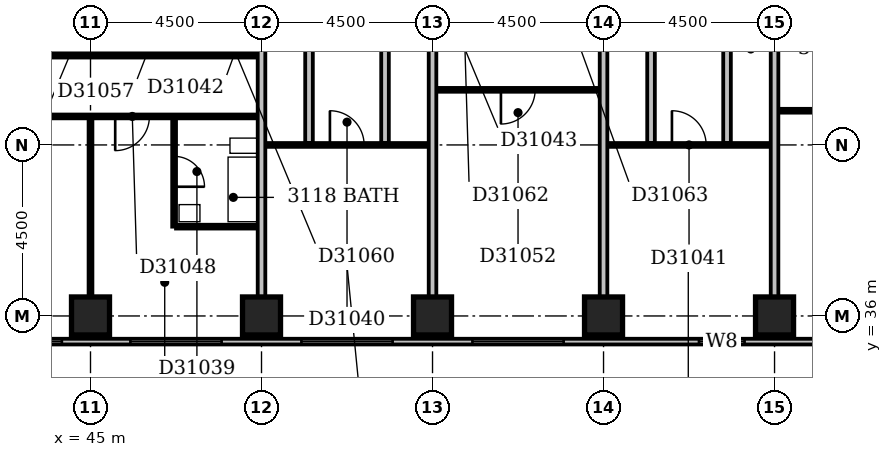
"""IFC4 building model, lengths in metres.
Left out: names, types, materials, properties, quantities, classifications, styles, units other than length and angle.
Written with IfcOpenShell. Run it as: python <this file> out.ifc"""

import sys

from ifc_helpers import new_model, si_unit, direction, frame, frame_2d, origin, origin_2d, place, context, subcontext, project, spatial, rectangle, extrude, element, fill, save


model = new_model("IFC4")
c1 = context("Model", 3, precision=1e-05, world=origin(), true_north=direction((0.0, 1.0)))
c2 = subcontext(c1, "Body", "Model", "MODEL_VIEW")
j1 = project(units=[si_unit("LENGTHUNIT", "METRE"), si_unit("PLANEANGLEUNIT", "RADIAN")], contexts=[c1])
p1 = place(None, origin())
s1 = spatial("IfcSite", under=j1, at=p1, CompositionType="ELEMENT")
p2 = place(p1, origin())
s2 = spatial("IfcBuilding", under=s1, at=p2, CompositionType="ELEMENT")
p3 = place(p2, frame((0.0, 0.0, 126.8)))
s3 = spatial("IfcBuildingStorey", under=s2, at=p3, CompositionType="ELEMENT", Elevation=126.8)
for number, where, z_axis, x_axis in (
    (1, (45.0, 36.0, -0.3), (0.0, 0.0, 1.0), (1.0, 0.0, 0.0)),
    (2, (49.5, 36.0, -0.3), (0.0, 0.0, 1.0), (1.0, 0.0, 0.0)),
    (3, (54.0, 36.0, -0.3), (0.0, 0.0, 1.0), (1.0, 0.0, 0.0)),
    (4, (58.5, 36.0, -0.3), (0.0, 0.0, 1.0), (1.0, 0.0, 0.0)),
    (5, (63.0, 36.0, -0.3), (0.0, 0.0, 1.0), (1.0, 0.0, 0.0)),
):
    element("IfcColumn", number, at=place(p3, frame(where, z_axis=z_axis, x_axis=x_axis)), inside=s3, PredefinedType="COLUMN", context=c2, shape_type="SweptSolid", body=[
        extrude(rectangle(XDim=1.0, YDim=1.0, at=origin_2d()), origin(), (0.0, 0.0, 1.0), 3.6),
    ])
p4 = place(p3, frame((23.1, 35.325, 0.0), z_axis=(0.0, 0.0, 1.0), x_axis=(1.0, 0.0, 0.0)))
e6 = element("IfcWall", 6, at=p4, inside=s3, PredefinedType="STANDARD", context=c2, shape_type="SweptSolid", body=[
    extrude(rectangle(XDim=45.15, YDim=0.15, at=frame_2d((22.575, 0.0))), origin(), (0.0, 0.0, 1.0), 2.7),
])
p5 = place(p4, frame((0.45, 0.0, 0.6)))
e7 = element("IfcOpeningElement", 7, at=p5, cuts=e6, PredefinedType="OPENING", context=c2, shape_type="SweptSolid", body=[
    extrude(rectangle(XDim=2.4, YDim=1.8, at=frame_2d((1.2, 0.9))), frame((0.0, 0.087, 0.0), z_axis=(0.0, -1.0, 0.0), x_axis=(1.0, 0.0, 0.0)), (0.0, 0.0, 1.0), 0.174),
])
p6 = place(p4, frame((4.743, 0.0, 0.6)))
e8 = element("IfcOpeningElement", 8, at=p6, cuts=e6, PredefinedType="OPENING", context=c2, shape_type="SweptSolid", body=[
    extrude(rectangle(XDim=1.8, YDim=1.8, at=frame_2d((0.9, 0.9))), frame((0.0, 0.087, 0.0), z_axis=(0.0, -1.0, 0.0), x_axis=(1.0, 0.0, 0.0)), (0.0, 0.0, 1.0), 0.174),
])
p7 = place(p4, frame((9.45, 0.0, 0.6)))
e9 = element("IfcOpeningElement", 9, at=p7, cuts=e6, PredefinedType="OPENING", context=c2, shape_type="SweptSolid", body=[
    extrude(rectangle(XDim=2.4, YDim=1.8, at=frame_2d((1.2, 0.9))), frame((0.0, 0.087, 0.0), z_axis=(0.0, -1.0, 0.0), x_axis=(1.0, 0.0, 0.0)), (0.0, 0.0, 1.0), 0.174),
])
p8 = place(p4, frame((13.95, 0.0, 0.6)))
e10 = element("IfcOpeningElement", 10, at=p8, cuts=e6, PredefinedType="OPENING", context=c2, shape_type="SweptSolid", body=[
    extrude(rectangle(XDim=2.4, YDim=1.8, at=frame_2d((1.2, 0.9))), frame((0.0, 0.087, 0.0), z_axis=(0.0, -1.0, 0.0), x_axis=(1.0, 0.0, 0.0)), (0.0, 0.0, 1.0), 0.174),
])
p9 = place(p4, frame((19.646, 0.0, 0.6)))
e11 = element("IfcOpeningElement", 11, at=p9, cuts=e6, PredefinedType="OPENING", context=c2, shape_type="SweptSolid", body=[
    extrude(rectangle(XDim=1.5, YDim=1.8, at=frame_2d((0.75, 0.9))), frame((0.0, 0.087, 0.0), z_axis=(0.0, -1.0, 0.0), x_axis=(1.0, 0.0, 0.0)), (0.0, 0.0, 1.0), 0.174),
])
p10 = place(p4, frame((22.95, 0.0, 0.6)))
e12 = element("IfcOpeningElement", 12, at=p10, cuts=e6, PredefinedType="OPENING", context=c2, shape_type="SweptSolid", body=[
    extrude(rectangle(XDim=2.4, YDim=1.8, at=frame_2d((1.2, 0.9))), frame((0.0, 0.087, 0.0), z_axis=(0.0, -1.0, 0.0), x_axis=(1.0, 0.0, 0.0)), (0.0, 0.0, 1.0), 0.174),
])
p11 = place(p4, frame((27.45, 0.0, 0.6)))
e13 = element("IfcOpeningElement", 13, at=p11, cuts=e6, PredefinedType="OPENING", context=c2, shape_type="SweptSolid", body=[
    extrude(rectangle(XDim=2.4, YDim=1.8, at=frame_2d((1.2, 0.9))), frame((0.0, 0.087, 0.0), z_axis=(0.0, -1.0, 0.0), x_axis=(1.0, 0.0, 0.0)), (0.0, 0.0, 1.0), 0.174),
])
p12 = place(p4, frame((31.95, 0.0, 0.6)))
e14 = element("IfcOpeningElement", 14, at=p12, cuts=e6, PredefinedType="OPENING", context=c2, shape_type="SweptSolid", body=[
    extrude(rectangle(XDim=2.4, YDim=1.8, at=frame_2d((1.2, 0.9))), frame((0.0, 0.087, 0.0), z_axis=(0.0, -1.0, 0.0), x_axis=(1.0, 0.0, 0.0)), (0.0, 0.0, 1.0), 0.174),
])
p13 = place(p4, frame((37.911, 0.0, 0.6)))
e15 = element("IfcOpeningElement", 15, at=p13, cuts=e6, PredefinedType="OPENING", context=c2, shape_type="SweptSolid", body=[
    extrude(rectangle(XDim=1.2, YDim=1.8, at=frame_2d((0.6, 0.9))), frame((0.0, 0.087, 0.0), z_axis=(0.0, -1.0, 0.0), x_axis=(1.0, 0.0, 0.0)), (0.0, 0.0, 1.0), 0.174),
])
p14 = place(p4, frame((40.95, 0.0, 0.6)))
e16 = element("IfcOpeningElement", 16, at=p14, cuts=e6, PredefinedType="OPENING", context=c2, shape_type="SweptSolid", body=[
    extrude(rectangle(XDim=2.4, YDim=1.8, at=frame_2d((1.2, 0.9))), frame((0.0, 0.087, 0.0), z_axis=(0.0, -1.0, 0.0), x_axis=(1.0, 0.0, 0.0)), (0.0, 0.0, 1.0), 0.174),
])
p15 = place(p3, frame((45.0, 36.5, 0.0), z_axis=(0.0, 0.0, 1.0), x_axis=(0.0, 1.0, 0.0)))
e17 = element("IfcWall", 17, at=p15, inside=s3, PredefinedType="PARTITIONING", context=c2, shape_type="SweptSolid", body=[
    extrude(rectangle(XDim=4.7, YDim=0.1, at=frame_2d((2.35, 0.0))), origin(), (0.0, 0.0, 1.0), 2.6),
])
p16 = place(p3, frame((49.5, 36.5, 0.0), z_axis=(0.0, 0.0, 1.0), x_axis=(0.0, 1.0, 0.0)))
e18 = element("IfcWall", 18, at=p16, inside=s3, PredefinedType="PARTITIONING", context=c2, shape_type="SweptSolid", body=[
    extrude(rectangle(XDim=12.9, YDim=0.2, at=frame_2d((6.45, 0.0))), origin(), (0.0, 0.0, 1.0), 3.3),
])
p17 = place(p3, frame((54.0, 36.5, 0.0), z_axis=(0.0, 0.0, 1.0), x_axis=(0.0, 1.0, 0.0)))
e19 = element("IfcWall", 19, at=p17, inside=s3, PredefinedType="PARTITIONING", context=c2, shape_type="SweptSolid", body=[
    extrude(rectangle(XDim=12.9, YDim=0.2, at=frame_2d((6.45, 0.0))), origin(), (0.0, 0.0, 1.0), 2.6),
])
p18 = place(p3, frame((58.5, 36.5, 0.0), z_axis=(0.0, 0.0, 1.0), x_axis=(0.0, 1.0, 0.0)))
e20 = element("IfcWall", 20, at=p18, inside=s3, PredefinedType="PARTITIONING", context=c2, shape_type="SweptSolid", body=[
    extrude(rectangle(XDim=12.9, YDim=0.2, at=frame_2d((6.45, 0.0))), origin(), (0.0, 0.0, 1.0), 3.3),
])
p19 = place(p3, frame((63.0, 36.5, 0.0), z_axis=(0.0, 0.0, 1.0), x_axis=(0.0, 1.0, 0.0)))
e21 = element("IfcWall", 21, at=p19, inside=s3, PredefinedType="PARTITIONING", context=c2, shape_type="SweptSolid", body=[
    extrude(rectangle(XDim=12.9, YDim=0.2, at=frame_2d((6.45, 0.0))), origin(), (0.0, 0.0, 1.0), 2.4),
])
p20 = place(p3, frame((47.2, 38.35, 0.0), z_axis=(0.0, 0.0, 1.0), x_axis=(0.0, 1.0, 0.0)))
e22 = element("IfcWall", 22, at=p20, inside=s3, PredefinedType="PLUMBINGWALL", context=c2, shape_type="SweptSolid", body=[
    extrude(rectangle(XDim=2.85, YDim=0.1, at=frame_2d((1.425, 0.0))), origin(), (0.0, 0.0, 1.0), 3.3),
])
p21 = place(p20, frame((1.05, 0.0, 0.0)))
e23 = element("IfcOpeningElement", 23, at=p21, cuts=e22, PredefinedType="OPENING", context=c2, shape_type="SweptSolid", body=[
    extrude(rectangle(XDim=0.8, YDim=2.1, at=frame_2d((0.4, 1.05))), frame((0.0, 0.062, 0.0), z_axis=(0.0, -1.0, 0.0), x_axis=(1.0, 0.0, 0.0)), (0.0, 0.0, 1.0), 0.124),
])
p22 = place(p3, frame((47.25, 38.35, 0.0), z_axis=(0.0, 0.0, 1.0), x_axis=(1.0, 0.0, 0.0)))
e24 = element("IfcWall", 24, at=p22, inside=s3, PredefinedType="PLUMBINGWALL", context=c2, shape_type="SweptSolid", body=[
    extrude(rectangle(XDim=2.15, YDim=0.1, at=frame_2d((1.075, 0.0))), origin(), (0.0, 0.0, 1.0), 3.3),
])
p23 = place(p3, frame((49.6, 40.5, 0.0), z_axis=(0.0, 0.0, 1.0), x_axis=(1.0, 0.0, 0.0)))
e25 = element("IfcWall", 25, at=p23, inside=s3, PredefinedType="PARTITIONING", context=c2, shape_type="SweptSolid", body=[
    extrude(rectangle(XDim=4.3, YDim=0.1, at=frame_2d((2.15, 0.0))), origin(), (0.0, 0.0, 1.0), 3.3),
])
p24 = place(p23, frame((1.7, 0.0, 0.0)))
e26 = element("IfcOpeningElement", 26, at=p24, cuts=e25, PredefinedType="OPENING", context=c2, shape_type="SweptSolid", body=[
    extrude(rectangle(XDim=0.9, YDim=2.1, at=frame_2d((0.45, 1.05))), frame((0.0, 0.062, 0.0), z_axis=(0.0, -1.0, 0.0), x_axis=(1.0, 0.0, 0.0)), (0.0, 0.0, 1.0), 0.124),
])
p25 = place(p3, frame((58.6, 40.5, 0.0), z_axis=(0.0, 0.0, 1.0), x_axis=(1.0, 0.0, 0.0)))
e27 = element("IfcWall", 27, at=p25, inside=s3, PredefinedType="PARTITIONING", context=c2, shape_type="SweptSolid", body=[
    extrude(rectangle(XDim=4.3, YDim=0.1, at=frame_2d((2.15, 0.0))), origin(), (0.0, 0.0, 1.0), 3.3),
])
p26 = place(p25, frame((1.7, 0.0, 0.0)))
e28 = element("IfcOpeningElement", 28, at=p26, cuts=e27, PredefinedType="OPENING", context=c2, shape_type="SweptSolid", body=[
    extrude(rectangle(XDim=0.9, YDim=2.1, at=frame_2d((0.45, 1.05))), frame((0.0, 0.062, 0.0), z_axis=(0.0, -1.0, 0.0), x_axis=(1.0, 0.0, 0.0)), (0.0, 0.0, 1.0), 0.124),
])
p27 = place(p3, frame((50.75, 40.55, 0.0), z_axis=(0.0, 0.0, 1.0), x_axis=(0.0, 1.0, 0.0)))
e29 = element("IfcWall", 29, at=p27, inside=s3, PredefinedType="PARTITIONING", context=c2, shape_type="SweptSolid", body=[
    extrude(rectangle(XDim=8.95, YDim=0.2, at=frame_2d((4.475, 0.0))), origin(), (0.0, 0.0, 1.0), 3.3),
])
p28 = place(p27, frame((5.55, 0.0, 0.0)))
e30 = element("IfcOpeningElement", 30, at=p28, cuts=e29, PredefinedType="OPENING", context=c2, shape_type="SweptSolid", body=[
    extrude(rectangle(XDim=0.8, YDim=2.1, at=frame_2d((0.4, 1.05))), frame((0.0, 0.112, 0.0), z_axis=(0.0, -1.0, 0.0), x_axis=(1.0, 0.0, 0.0)), (0.0, 0.0, 1.0), 0.224),
])
p29 = place(p3, frame((52.75, 40.55, 0.0), z_axis=(0.0, 0.0, 1.0), x_axis=(0.0, 1.0, 0.0)))
e31 = element("IfcWall", 31, at=p29, inside=s3, PredefinedType="PARTITIONING", context=c2, shape_type="SweptSolid", body=[
    extrude(rectangle(XDim=8.95, YDim=0.2, at=frame_2d((4.475, 0.0))), origin(), (0.0, 0.0, 1.0), 3.3),
])
p30 = place(p29, frame((5.55, 0.0, 0.0)))
e32 = element("IfcOpeningElement", 32, at=p30, cuts=e31, PredefinedType="OPENING", context=c2, shape_type="SweptSolid", body=[
    extrude(rectangle(XDim=0.8, YDim=2.1, at=frame_2d((0.4, 1.05))), frame((0.0, 0.112, 0.0), z_axis=(0.0, -1.0, 0.0), x_axis=(1.0, 0.0, 0.0)), (0.0, 0.0, 1.0), 0.224),
])
p31 = place(p3, frame((59.75, 40.55, 0.0), z_axis=(0.0, 0.0, 1.0), x_axis=(0.0, 1.0, 0.0)))
e33 = element("IfcWall", 33, at=p31, inside=s3, PredefinedType="PARTITIONING", context=c2, shape_type="SweptSolid", body=[
    extrude(rectangle(XDim=8.95, YDim=0.2, at=frame_2d((4.475, 0.0))), origin(), (0.0, 0.0, 1.0), 3.3),
])
p32 = place(p31, frame((5.55, 0.0, 0.0)))
e34 = element("IfcOpeningElement", 34, at=p32, cuts=e33, PredefinedType="OPENING", context=c2, shape_type="SweptSolid", body=[
    extrude(rectangle(XDim=0.8, YDim=2.1, at=frame_2d((0.4, 1.05))), frame((0.0, 0.112, 0.0), z_axis=(0.0, -1.0, 0.0), x_axis=(1.0, 0.0, 0.0)), (0.0, 0.0, 1.0), 0.224),
])
p33 = place(p3, frame((61.75, 40.55, 0.0), z_axis=(0.0, 0.0, 1.0), x_axis=(0.0, 1.0, 0.0)))
e35 = element("IfcWall", 35, at=p33, inside=s3, PredefinedType="PARTITIONING", context=c2, shape_type="SweptSolid", body=[
    extrude(rectangle(XDim=8.95, YDim=0.2, at=frame_2d((4.475, 0.0))), origin(), (0.0, 0.0, 1.0), 3.3),
])
p34 = place(p33, frame((5.55, 0.0, 0.0)))
e36 = element("IfcOpeningElement", 36, at=p34, cuts=e35, PredefinedType="OPENING", context=c2, shape_type="SweptSolid", body=[
    extrude(rectangle(XDim=0.8, YDim=2.1, at=frame_2d((0.4, 1.05))), frame((0.0, 0.112, 0.0), z_axis=(0.0, -1.0, 0.0), x_axis=(1.0, 0.0, 0.0)), (0.0, 0.0, 1.0), 0.224),
])
p35 = place(p3, frame((31.6, 41.25, 0.0), z_axis=(0.0, 0.0, 1.0), x_axis=(1.0, 0.0, 0.0)))
e37 = element("IfcWall", 37, at=p35, inside=s3, PredefinedType="PARTITIONING", context=c2, shape_type="SweptSolid", body=[
    extrude(rectangle(XDim=17.8, YDim=0.1, at=frame_2d((8.9, 0.0))), origin(), (0.0, 0.0, 1.0), 3.3),
])
p36 = place(p35, frame((2.85, 0.0, 0.0)))
e38 = element("IfcOpeningElement", 38, at=p36, cuts=e37, PredefinedType="OPENING", context=c2, shape_type="SweptSolid", body=[
    extrude(rectangle(XDim=0.9, YDim=2.1, at=frame_2d((0.45, 1.05))), frame((0.0, 0.062, 0.0), z_axis=(0.0, -1.0, 0.0), x_axis=(1.0, 0.0, 0.0)), (0.0, 0.0, 1.0), 0.124),
])
p37 = place(p35, frame((8.4, 0.0, 0.0)))
e39 = element("IfcOpeningElement", 39, at=p37, cuts=e37, PredefinedType="OPENING", context=c2, shape_type="SweptSolid", body=[
    extrude(rectangle(XDim=0.9, YDim=2.1, at=frame_2d((0.45, 1.05))), frame((0.0, 0.062, 0.0), z_axis=(0.0, -1.0, 0.0), x_axis=(1.0, 0.0, 0.0)), (0.0, 0.0, 1.0), 0.124),
])
p38 = place(p35, frame((14.05, 0.0, 0.0)))
e40 = element("IfcOpeningElement", 40, at=p38, cuts=e37, PredefinedType="OPENING", context=c2, shape_type="SweptSolid", body=[
    extrude(rectangle(XDim=0.9, YDim=2.1, at=frame_2d((0.45, 1.05))), frame((0.0, 0.062, 0.0), z_axis=(0.0, -1.0, 0.0), x_axis=(1.0, 0.0, 0.0)), (0.0, 0.0, 1.0), 0.124),
])
p39 = place(p3, frame((63.1, 41.4, 0.0), z_axis=(0.0, 0.0, 1.0), x_axis=(1.0, 0.0, 0.0)))
e41 = element("IfcWall", 41, at=p39, inside=s3, PredefinedType="PARTITIONING", context=c2, shape_type="SweptSolid", body=[
    extrude(rectangle(XDim=5.0, YDim=0.1, at=frame_2d((2.5, 0.0))), origin(), (0.0, 0.0, 1.0), 3.3),
])
p40 = place(p39, frame((1.7, 0.0, 0.0)))
e42 = element("IfcOpeningElement", 42, at=p40, cuts=e41, PredefinedType="OPENING", context=c2, shape_type="SweptSolid", body=[
    extrude(rectangle(XDim=0.9, YDim=2.1, at=frame_2d((0.45, 1.05))), frame((0.0, 0.062, 0.0), z_axis=(0.0, -1.0, 0.0), x_axis=(1.0, 0.0, 0.0)), (0.0, 0.0, 1.0), 0.124),
])
p41 = place(p3, frame((54.1, 41.95, 0.0), z_axis=(0.0, 0.0, 1.0), x_axis=(1.0, 0.0, 0.0)))
e43 = element("IfcWall", 43, at=p41, inside=s3, PredefinedType="PARTITIONING", context=c2, shape_type="SweptSolid", body=[
    extrude(rectangle(XDim=4.3, YDim=0.1, at=frame_2d((2.15, 0.0))), origin(), (0.0, 0.0, 1.0), 3.3),
])
p42 = place(p41, frame((1.7, 0.0, 0.0)))
e44 = element("IfcOpeningElement", 44, at=p42, cuts=e43, PredefinedType="OPENING", context=c2, shape_type="SweptSolid", body=[
    extrude(rectangle(XDim=0.9, YDim=2.1, at=frame_2d((0.45, 1.05))), frame((0.0, 0.062, 0.0), z_axis=(0.0, -1.0, 0.0), x_axis=(1.0, 0.0, 0.0)), (0.0, 0.0, 1.0), 0.124),
])
p43 = place(p3, frame((38.25, 42.85, 0.0), z_axis=(0.0, 0.0, 1.0), x_axis=(1.0, 0.0, 0.0)))
e45 = element("IfcWall", 45, at=p43, inside=s3, PredefinedType="PARTITIONING", context=c2, shape_type="SweptSolid", body=[
    extrude(rectangle(XDim=11.15, YDim=0.1, at=frame_2d((5.575, 0.0))), origin(), (0.0, 0.0, 1.0), 3.3),
])
p44 = place(p43, frame((0.75, 0.0, 0.0)))
e46 = element("IfcOpeningElement", 46, at=p44, cuts=e45, PredefinedType="OPENING", context=c2, shape_type="SweptSolid", body=[
    extrude(rectangle(XDim=0.8, YDim=2.1, at=frame_2d((0.4, 1.05))), frame((0.0, 0.062, 0.0), z_axis=(0.0, -1.0, 0.0), x_axis=(1.0, 0.0, 0.0)), (0.0, 0.0, 1.0), 0.124),
])
p45 = place(p43, frame((8.05, 0.0, 0.0)))
e47 = element("IfcOpeningElement", 47, at=p45, cuts=e45, PredefinedType="OPENING", context=c2, shape_type="SweptSolid", body=[
    extrude(rectangle(XDim=0.8, YDim=2.1, at=frame_2d((0.4, 1.05))), frame((0.0, 0.062, 0.0), z_axis=(0.0, -1.0, 0.0), x_axis=(1.0, 0.0, 0.0)), (0.0, 0.0, 1.0), 0.124),
])
p46 = place(p43, frame((4.25, 0.0, 0.0)))
e48 = element("IfcOpeningElement", 48, at=p46, cuts=e45, PredefinedType="OPENING", context=c2, shape_type="SweptSolid", body=[
    extrude(rectangle(XDim=0.8, YDim=2.1, at=frame_2d((0.4, 1.05))), frame((0.0, 0.062, 0.0), z_axis=(0.0, -1.0, 0.0), x_axis=(1.0, 0.0, 0.0)), (0.0, 0.0, 1.0), 0.124),
])
p47 = place(p43, frame((6.05, 0.0, 0.0)))
e49 = element("IfcOpeningElement", 49, at=p47, cuts=e45, PredefinedType="OPENING", context=c2, shape_type="SweptSolid", body=[
    extrude(rectangle(XDim=0.8, YDim=2.1, at=frame_2d((0.4, 1.05))), frame((0.0, 0.062, 0.0), z_axis=(0.0, -1.0, 0.0), x_axis=(1.0, 0.0, 0.0)), (0.0, 0.0, 1.0), 0.124),
])
p48 = place(p43, frame((9.95, 0.0, 0.0)))
e50 = element("IfcOpeningElement", 50, at=p48, cuts=e45, PredefinedType="OPENING", context=c2, shape_type="SweptSolid", body=[
    extrude(rectangle(XDim=0.8, YDim=2.1, at=frame_2d((0.4, 1.05))), frame((0.0, 0.062, 0.0), z_axis=(0.0, -1.0, 0.0), x_axis=(1.0, 0.0, 0.0)), (0.0, 0.0, 1.0), 0.124),
])
p49 = place(p43, frame((2.7, 0.0, 0.0)))
e51 = element("IfcOpeningElement", 51, at=p49, cuts=e45, PredefinedType="OPENING", context=c2, shape_type="SweptSolid", body=[
    extrude(rectangle(XDim=0.8, YDim=2.1, at=frame_2d((0.4, 1.05))), frame((0.0, 0.062, 0.0), z_axis=(0.0, -1.0, 0.0), x_axis=(1.0, 0.0, 0.0)), (0.0, 0.0, 1.0), 0.124),
])
p50 = place(p3, frame((45.7, 42.9, 0.0), z_axis=(0.0, 0.0, 1.0), x_axis=(0.0, 1.0, 0.0)))
e52 = element("IfcWall", 52, at=p50, inside=s3, PredefinedType="PARTITIONING", context=c2, shape_type="SweptSolid", body=[
    extrude(rectangle(XDim=6.5, YDim=0.1, at=frame_2d((3.25, 0.0))), origin(), (0.0, 0.0, 1.0), 2.6),
])
p51 = place(p3, frame((47.7, 42.9, 0.0), z_axis=(0.0, 0.0, 1.0), x_axis=(0.0, 1.0, 0.0)))
e53 = element("IfcWall", 53, at=p51, inside=s3, PredefinedType="PARTITIONING", context=c2, shape_type="SweptSolid", body=[
    extrude(rectangle(XDim=6.5, YDim=0.1, at=frame_2d((3.25, 0.0))), origin(), (0.0, 0.0, 1.0), 3.3),
])
p52 = place(p9, origin())
e54 = element("IfcWindow", 54, at=p52, inside=s3, PartitioningType="SINGLE_PANEL", PredefinedType="WINDOW", context=c2, shape_type="SweptSolid", body=[
    extrude(rectangle(XDim=1.5, YDim=1.8, at=frame_2d((0.75, 0.9))), frame((0.0, 0.03, 0.0), z_axis=(0.0, -1.0, 0.0), x_axis=(1.0, 0.0, 0.0)), (0.0, 0.0, 1.0), 0.06),
])
fill(e11, e54)
p53 = place(p10, origin())
e55 = element("IfcWindow", 55, at=p53, inside=s3, PartitioningType="SINGLE_PANEL", PredefinedType="WINDOW", context=c2, shape_type="SweptSolid", body=[
    extrude(rectangle(XDim=2.4, YDim=1.8, at=frame_2d((1.2, 0.9))), frame((0.0, 0.03, 0.0), z_axis=(0.0, -1.0, 0.0), x_axis=(1.0, 0.0, 0.0)), (0.0, 0.0, 1.0), 0.06),
])
fill(e12, e55)
p54 = place(p11, origin())
e56 = element("IfcWindow", 56, at=p54, inside=s3, PartitioningType="SINGLE_PANEL", PredefinedType="WINDOW", context=c2, shape_type="SweptSolid", body=[
    extrude(rectangle(XDim=2.4, YDim=1.8, at=frame_2d((1.2, 0.9))), frame((0.0, 0.03, 0.0), z_axis=(0.0, -1.0, 0.0), x_axis=(1.0, 0.0, 0.0)), (0.0, 0.0, 1.0), 0.06),
])
fill(e13, e56)
p55 = place(p12, origin())
e57 = element("IfcWindow", 57, at=p55, inside=s3, PartitioningType="SINGLE_PANEL", PredefinedType="WINDOW", context=c2, shape_type="SweptSolid", body=[
    extrude(rectangle(XDim=2.4, YDim=1.8, at=frame_2d((1.2, 0.9))), frame((0.0, 0.03, 0.0), z_axis=(0.0, -1.0, 0.0), x_axis=(1.0, 0.0, 0.0)), (0.0, 0.0, 1.0), 0.06),
])
fill(e14, e57)
p56 = place(p13, origin())
e58 = element("IfcWindow", 58, at=p56, inside=s3, PartitioningType="SINGLE_PANEL", PredefinedType="WINDOW", context=c2, shape_type="SweptSolid", body=[
    extrude(rectangle(XDim=1.2, YDim=1.8, at=frame_2d((0.6, 0.9))), frame((0.0, 0.03, 0.0), z_axis=(0.0, -1.0, 0.0), x_axis=(1.0, 0.0, 0.0)), (0.0, 0.0, 1.0), 0.06),
])
fill(e15, e58)
p57 = place(p21, frame((0.8, 0.0, 0.0), z_axis=(0.0, 0.0, 1.0), x_axis=(-1.0, 0.0, 0.0)))
e59 = element("IfcDoor", 59, at=p57, inside=s3, OperationType="SINGLE_SWING_RIGHT", PredefinedType="DOOR", context=c2, shape_type="SweptSolid", body=[
    extrude(rectangle(XDim=0.8, YDim=2.1, at=frame_2d((0.4, 1.05))), frame((0.0, 0.025, 0.0), z_axis=(0.0, -1.0, 0.0), x_axis=(1.0, 0.0, 0.0)), (0.0, 0.0, 1.0), 0.05),
])
fill(e23, e59)
p58 = place(p24, origin())
e60 = element("IfcDoor", 60, at=p58, inside=s3, OperationType="SINGLE_SWING_LEFT", PredefinedType="DOOR", context=c2, shape_type="SweptSolid", body=[
    extrude(rectangle(XDim=0.9, YDim=2.1, at=frame_2d((0.45, 1.05))), frame((0.0, 0.025, 0.0), z_axis=(0.0, -1.0, 0.0), x_axis=(1.0, 0.0, 0.0)), (0.0, 0.0, 1.0), 0.05),
])
fill(e26, e60)
p59 = place(p26, origin())
e61 = element("IfcDoor", 61, at=p59, inside=s3, OperationType="SINGLE_SWING_LEFT", PredefinedType="DOOR", context=c2, shape_type="SweptSolid", body=[
    extrude(rectangle(XDim=0.9, YDim=2.1, at=frame_2d((0.45, 1.05))), frame((0.0, 0.025, 0.0), z_axis=(0.0, -1.0, 0.0), x_axis=(1.0, 0.0, 0.0)), (0.0, 0.0, 1.0), 0.05),
])
fill(e28, e61)
p60 = place(p38, frame((0.9, 0.0, 0.0), z_axis=(0.0, 0.0, 1.0), x_axis=(-1.0, 0.0, 0.0)))
e62 = element("IfcDoor", 62, at=p60, inside=s3, OperationType="SINGLE_SWING_RIGHT", PredefinedType="DOOR", context=c2, shape_type="SweptSolid", body=[
    extrude(rectangle(XDim=0.9, YDim=2.1, at=frame_2d((0.45, 1.05))), frame((0.0, 0.025, 0.0), z_axis=(0.0, -1.0, 0.0), x_axis=(1.0, 0.0, 0.0)), (0.0, 0.0, 1.0), 0.05),
])
fill(e40, e62)
p61 = place(p42, frame((0.9, 0.0, 0.0), z_axis=(0.0, 0.0, 1.0), x_axis=(-1.0, 0.0, 0.0)))
e63 = element("IfcDoor", 63, at=p61, inside=s3, OperationType="SINGLE_SWING_RIGHT", PredefinedType="DOOR", context=c2, shape_type="SweptSolid", body=[
    extrude(rectangle(XDim=0.9, YDim=2.1, at=frame_2d((0.45, 1.05))), frame((0.0, 0.025, 0.0), z_axis=(0.0, -1.0, 0.0), x_axis=(1.0, 0.0, 0.0)), (0.0, 0.0, 1.0), 0.05),
])
fill(e44, e63)
p62 = place(p45, origin())
e64 = element("IfcDoor", 64, at=p62, inside=s3, OperationType="SINGLE_SWING_LEFT", PredefinedType="DOOR", context=c2, shape_type="SweptSolid", body=[
    extrude(rectangle(XDim=0.8, YDim=2.1, at=frame_2d((0.4, 1.05))), frame((0.0, 0.025, 0.0), z_axis=(0.0, -1.0, 0.0), x_axis=(1.0, 0.0, 0.0)), (0.0, 0.0, 1.0), 0.05),
])
fill(e47, e64)
p63 = place(p47, origin())
e65 = element("IfcDoor", 65, at=p63, inside=s3, OperationType="SINGLE_SWING_LEFT", PredefinedType="DOOR", context=c2, shape_type="SweptSolid", body=[
    extrude(rectangle(XDim=0.8, YDim=2.1, at=frame_2d((0.4, 1.05))), frame((0.0, 0.025, 0.0), z_axis=(0.0, -1.0, 0.0), x_axis=(1.0, 0.0, 0.0)), (0.0, 0.0, 1.0), 0.05),
])
fill(e49, e65)
p64 = place(p48, origin())
e66 = element("IfcDoor", 66, at=p64, inside=s3, OperationType="SINGLE_SWING_LEFT", PredefinedType="DOOR", context=c2, shape_type="SweptSolid", body=[
    extrude(rectangle(XDim=0.8, YDim=2.1, at=frame_2d((0.4, 1.05))), frame((0.0, 0.025, 0.0), z_axis=(0.0, -1.0, 0.0), x_axis=(1.0, 0.0, 0.0)), (0.0, 0.0, 1.0), 0.05),
])
fill(e50, e66)
save(model, sys.argv[1])
